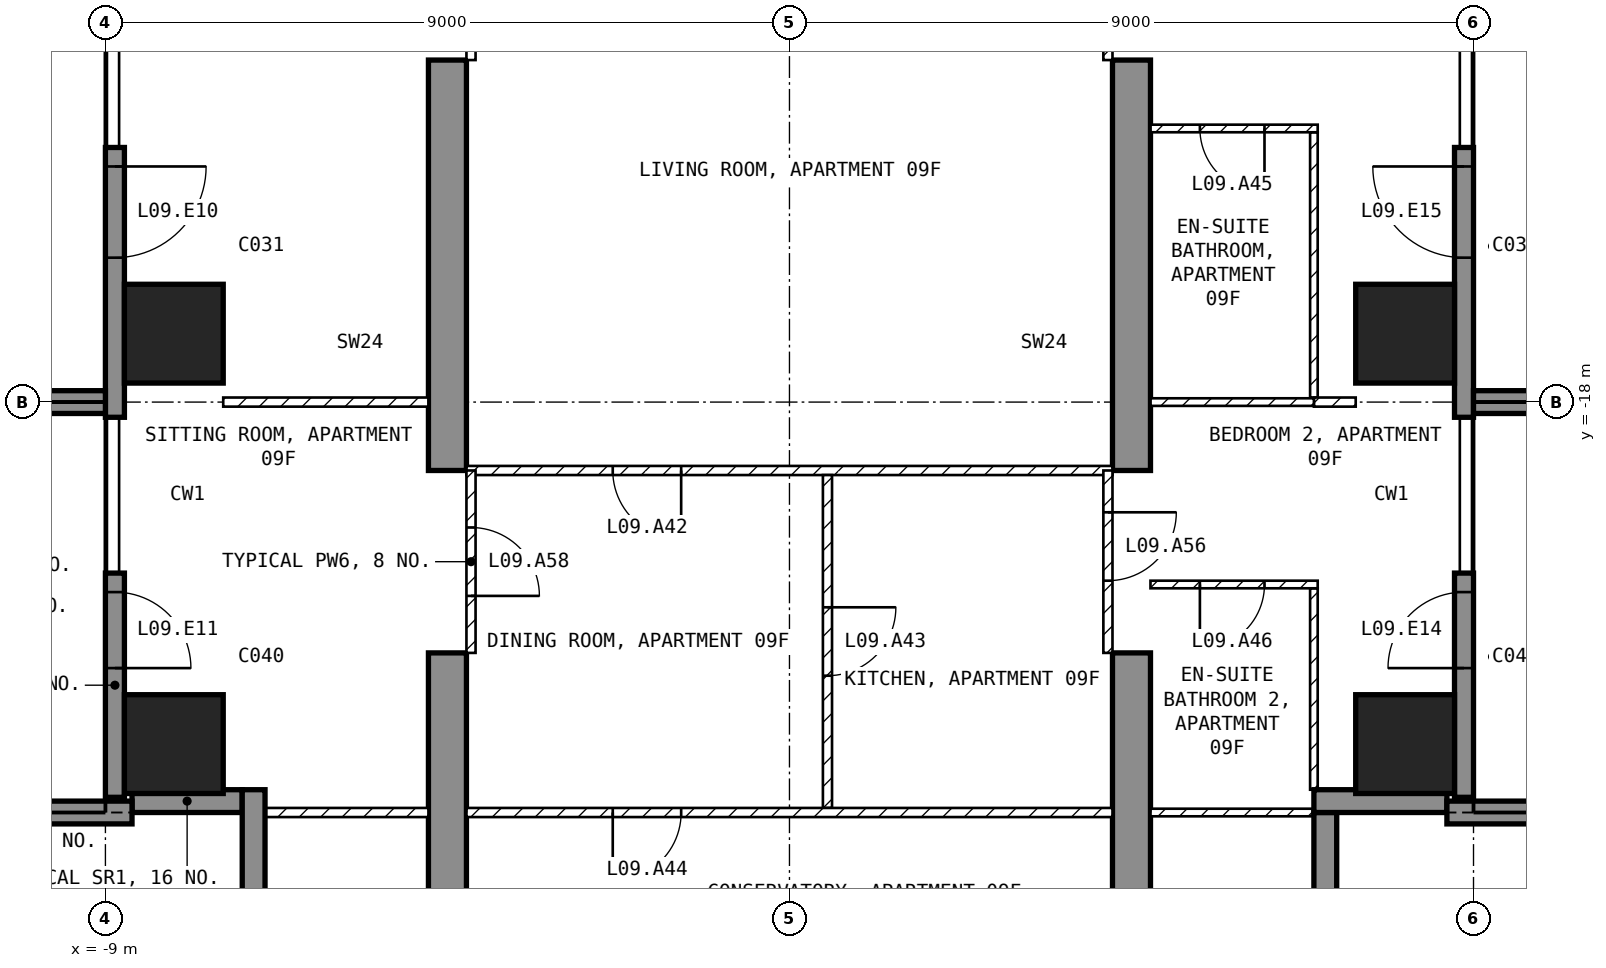
"""IFC4 building model, lengths in metres.
Left out: names, types, materials, properties, quantities, classifications, styles, units other than length and angle.
Written with IfcOpenShell. Run it as: python <this file> out.ifc"""

import sys

from ifc_helpers import new_model, si_unit, direction, frame, frame_2d, origin, origin_2d, place, context, subcontext, project, spatial, polyline, rectangle, outline, extrude, element, fill, save


model = new_model("IFC4")
c1 = context("Model", 3, precision=1e-05, world=origin(), true_north=direction((0.0, 1.0)))
c2 = subcontext(c1, "Body", "Model", "MODEL_VIEW")
j1 = project(units=[si_unit("LENGTHUNIT", "METRE"), si_unit("PLANEANGLEUNIT", "RADIAN")], contexts=[c1])
p1 = place(None, origin())
s1 = spatial("IfcSite", under=j1, at=p1, CompositionType="ELEMENT")
p2 = place(p1, origin())
s2 = spatial("IfcBuilding", under=s1, at=p2, CompositionType="ELEMENT")
p3 = place(p2, frame((0.0, 0.0, 50.5)))
s3 = spatial("IfcBuildingStorey", under=s2, at=p3, CompositionType="ELEMENT", Elevation=50.5)
for number, where, z_axis, x_axis in (
    (1, (-8.1, -22.5, -0.25), (0.0, 0.0, 1.0), (1.0, 0.0, 0.0)),
    (2, (-8.1, -17.1, -0.25), (0.0, 0.0, 1.0), (1.0, 0.0, 0.0)),
    (3, (8.1, -22.5, -0.25), (0.0, 0.0, 1.0), (1.0, 0.0, 0.0)),
    (4, (8.1, -17.1, -0.25), (0.0, 0.0, 1.0), (1.0, 0.0, 0.0)),
):
    element("IfcColumn", number, at=place(p3, frame(where, z_axis=z_axis, x_axis=x_axis)), inside=s3, PredefinedType="COLUMN", context=c2, shape_type="SweptSolid", body=[
        extrude(rectangle(XDim=1.3, YDim=1.3, at=origin_2d()), origin(), (0.0, 0.0, 1.0), 3.5),
    ])
for number, where, z_axis, x_axis in (
    (5, (-4.75, -25.45, -0.25), (1.0, 0.0, 0.0), (0.0, 1.0, 0.0)),
    (6, (4.25, -25.45, -0.25), (1.0, 0.0, 0.0), (0.0, 1.0, 0.0)),
):
    element("IfcWall", number, at=place(p3, frame(where, z_axis=z_axis, x_axis=x_axis)), inside=s3, PredefinedType="SHEAR", context=c2, shape_type="SweptSolid", body=[
        extrude(outline(polyline([(0.0, 0.0), (4.15, 0.0), (4.15, 2.65), (6.55, 2.65), (6.55, 0.0), (11.95, 0.0), (11.95, 2.65), (14.35, 2.65), (14.35, 0.0), (16.45, 0.0), (16.45, 3.5), (0.0, 3.5), (0.0, 0.0)])), origin(), (0.0, 0.0, 1.0), 0.5),
    ])
p4 = place(p3, frame((-8.875, -14.65, 0.0), z_axis=(0.0, 0.0, 1.0), x_axis=(0.0, -1.0, 0.0)))
e7 = element("IfcWall", 7, at=p4, inside=s3, PredefinedType="SOLIDWALL", context=c2, shape_type="SweptSolid", body=[
    extrude(rectangle(XDim=3.55, YDim=0.25, at=frame_2d((1.775, 0.0))), origin(), (0.0, 0.0, 1.0), 3.25),
])
p5 = place(p4, frame((0.25, 0.0, 0.0)))
e8 = element("IfcOpeningElement", 8, at=p5, cuts=e7, PredefinedType="OPENING", context=c2, shape_type="SweptSolid", body=[
    extrude(rectangle(XDim=1.2, YDim=2.4, at=frame_2d((0.6, 1.2))), frame((0.0, 0.135, 0.0), z_axis=(0.0, -1.0, 0.0), x_axis=(1.0, 0.0, 0.0)), (0.0, 0.0, 1.0), 0.27),
])
p6 = place(p3, frame((-8.875, -20.25, 0.0), z_axis=(0.0, 0.0, 1.0), x_axis=(0.0, -1.0, 0.0)))
e9 = element("IfcWall", 9, at=p6, inside=s3, PredefinedType="SOLIDWALL", context=c2, shape_type="SweptSolid", body=[
    extrude(rectangle(XDim=2.95, YDim=0.25, at=frame_2d((1.475, 0.0))), origin(), (0.0, 0.0, 1.0), 3.25),
])
p7 = place(p6, frame((0.25, 0.0, 0.0)))
e10 = element("IfcOpeningElement", 10, at=p7, cuts=e9, PredefinedType="OPENING", context=c2, shape_type="SweptSolid", body=[
    extrude(rectangle(XDim=1.0, YDim=2.4, at=frame_2d((0.5, 1.2))), frame((0.0, 0.135, 0.0), z_axis=(0.0, -1.0, 0.0), x_axis=(1.0, 0.0, 0.0)), (0.0, 0.0, 1.0), 0.27),
])
p8 = place(p3, frame((8.875, -23.2, 0.0), z_axis=(0.0, 0.0, 1.0), x_axis=(0.0, 1.0, 0.0)))
e11 = element("IfcWall", 11, at=p8, inside=s3, PredefinedType="SOLIDWALL", context=c2, shape_type="SweptSolid", body=[
    extrude(rectangle(XDim=2.95, YDim=0.25, at=frame_2d((1.475, 0.0))), origin(), (0.0, 0.0, 1.0), 3.25),
])
p9 = place(p8, frame((1.7, 0.0, 0.0)))
e12 = element("IfcOpeningElement", 12, at=p9, cuts=e11, PredefinedType="OPENING", context=c2, shape_type="SweptSolid", body=[
    extrude(rectangle(XDim=1.0, YDim=2.4, at=frame_2d((0.5, 1.2))), frame((0.0, 0.135, 0.0), z_axis=(0.0, -1.0, 0.0), x_axis=(1.0, 0.0, 0.0)), (0.0, 0.0, 1.0), 0.27),
])
p10 = place(p3, frame((8.875, -18.2, 0.0), z_axis=(0.0, 0.0, 1.0), x_axis=(0.0, 1.0, 0.0)))
e13 = element("IfcWall", 13, at=p10, inside=s3, PredefinedType="SOLIDWALL", context=c2, shape_type="SweptSolid", body=[
    extrude(rectangle(XDim=3.55, YDim=0.25, at=frame_2d((1.775, 0.0))), origin(), (0.0, 0.0, 1.0), 3.25),
])
p11 = place(p10, frame((2.1, 0.0, 0.0)))
e14 = element("IfcOpeningElement", 14, at=p11, cuts=e13, PredefinedType="OPENING", context=c2, shape_type="SweptSolid", body=[
    extrude(rectangle(XDim=1.2, YDim=2.4, at=frame_2d((0.6, 1.2))), frame((0.0, 0.135, 0.0), z_axis=(0.0, -1.0, 0.0), x_axis=(1.0, 0.0, 0.0)), (0.0, 0.0, 1.0), 0.27),
])
p12 = place(p3, frame((7.05, -25.2, 0.0), z_axis=(0.0, 0.0, 1.0), x_axis=(0.0, 1.0, 0.0)))
e15 = element("IfcWall", 15, at=p12, inside=s3, PredefinedType="SOLIDWALL", context=c2, shape_type="SweptSolid", body=[
    extrude(rectangle(XDim=1.8, YDim=0.3, at=frame_2d((0.9, 0.0))), origin(), (0.0, 0.0, 1.0), 3.25),
])
p13 = place(p3, frame((6.9, -23.25, 0.0), z_axis=(0.0, 0.0, 1.0), x_axis=(1.0, 0.0, 0.0)))
e16 = element("IfcWall", 16, at=p13, inside=s3, PredefinedType="SOLIDWALL", context=c2, shape_type="SweptSolid", body=[
    extrude(rectangle(XDim=1.75, YDim=0.3, at=frame_2d((0.875, 0.0))), origin(), (0.0, 0.0, 1.0), 3.25),
])
p14 = place(p3, frame((-8.65, -23.25, 0.0), z_axis=(0.0, 0.0, 1.0), x_axis=(1.0, 0.0, 0.0)))
e17 = element("IfcWall", 17, at=p14, inside=s3, PredefinedType="SOLIDWALL", context=c2, shape_type="SweptSolid", body=[
    extrude(rectangle(XDim=1.45, YDim=0.3, at=frame_2d((0.725, 0.0))), origin(), (0.0, 0.0, 1.0), 3.25),
])
p15 = place(p3, frame((-7.05, -23.1, 0.0), z_axis=(0.0, 0.0, 1.0), x_axis=(0.0, -1.0, 0.0)))
e18 = element("IfcWall", 18, at=p15, inside=s3, PredefinedType="SOLIDWALL", context=c2, shape_type="SweptSolid", body=[
    extrude(rectangle(XDim=1.8, YDim=0.3, at=frame_2d((0.9, 0.0))), origin(), (0.0, 0.0, 1.0), 3.25),
])
p16 = place(p3, frame((-8.65, -23.4, 0.0), z_axis=(0.0, 0.0, 1.0), x_axis=(-1.0, 0.0, 0.0)))
e19 = element("IfcWall", 19, at=p16, inside=s3, PredefinedType="SOLIDWALL", context=c2, shape_type="SweptSolid", body=[
    extrude(rectangle(XDim=3.05, YDim=0.3, at=frame_2d((1.525, 0.0))), origin(), (0.0, 0.0, 1.0), 3.25),
])
p17 = place(p3, frame((-9.0, -18.0, 0.0), z_axis=(0.0, 0.0, 1.0), x_axis=(-1.0, 0.0, 0.0)))
e20 = element("IfcWall", 20, at=p17, inside=s3, PredefinedType="SOLIDWALL", context=c2, shape_type="SweptSolid", body=[
    extrude(rectangle(XDim=2.7, YDim=0.3, at=frame_2d((1.35, 0.0))), origin(), (0.0, 0.0, 1.0), 3.25),
])
p18 = place(p3, frame((8.65, -23.4, 0.0), z_axis=(0.0, 0.0, 1.0), x_axis=(1.0, 0.0, 0.0)))
e21 = element("IfcWall", 21, at=p18, inside=s3, PredefinedType="SOLIDWALL", context=c2, shape_type="SweptSolid", body=[
    extrude(rectangle(XDim=3.05, YDim=0.3, at=frame_2d((1.525, 0.0))), origin(), (0.0, 0.0, 1.0), 3.25),
])
p19 = place(p3, frame((9.0, -18.0, 0.0), z_axis=(0.0, 0.0, 1.0), x_axis=(1.0, 0.0, 0.0)))
e22 = element("IfcWall", 22, at=p19, inside=s3, PredefinedType="SOLIDWALL", context=c2, shape_type="SweptSolid", body=[
    extrude(rectangle(XDim=2.7, YDim=0.3, at=frame_2d((1.35, 0.0))), origin(), (0.0, 0.0, 1.0), 3.25),
])
p20 = place(p3, frame((4.25, -18.9, 0.0), z_axis=(0.0, 0.0, 1.0), x_axis=(-1.0, 0.0, 0.0)))
e23 = element("IfcWall", 23, at=p20, inside=s3, PredefinedType="PARTITIONING", context=c2, shape_type="SweptSolid", body=[
    extrude(rectangle(XDim=8.5, YDim=0.12, at=frame_2d((4.25, 0.0))), origin(), (0.0, 0.0, 1.0), 3.25),
])
p21 = place(p20, frame((5.675, 0.0, 0.0)))
e24 = element("IfcOpeningElement", 24, at=p21, cuts=e23, PredefinedType="OPENING", context=c2, shape_type="SweptSolid", body=[
    extrude(rectangle(XDim=0.9, YDim=2.1, at=frame_2d((0.45, 1.05))), frame((0.0, 0.07, 0.0), z_axis=(0.0, -1.0, 0.0), x_axis=(1.0, 0.0, 0.0)), (0.0, 0.0, 1.0), 0.14),
])
p22 = place(p3, frame((0.5, -18.96, 0.0), z_axis=(0.0, 0.0, 1.0), x_axis=(0.0, -1.0, 0.0)))
e25 = element("IfcWall", 25, at=p22, inside=s3, PredefinedType="PARTITIONING", context=c2, shape_type="SweptSolid", body=[
    extrude(rectangle(XDim=4.38, YDim=0.12, at=frame_2d((2.19, 0.0))), origin(), (0.0, 0.0, 1.0), 3.25),
])
p23 = place(p22, frame((1.74, 0.0, 0.0)))
e26 = element("IfcOpeningElement", 26, at=p23, cuts=e25, PredefinedType="OPENING", context=c2, shape_type="SweptSolid", body=[
    extrude(rectangle(XDim=0.9, YDim=2.1, at=frame_2d((0.45, 1.05))), frame((0.0, 0.07, 0.0), z_axis=(0.0, -1.0, 0.0), x_axis=(1.0, 0.0, 0.0)), (0.0, 0.0, 1.0), 0.14),
])
p24 = place(p3, frame((4.25, -23.4, 0.0), z_axis=(0.0, 0.0, 1.0), x_axis=(-1.0, 0.0, 0.0)))
e27 = element("IfcWall", 27, at=p24, inside=s3, PredefinedType="PARTITIONING", context=c2, shape_type="SweptSolid", body=[
    extrude(rectangle(XDim=8.5, YDim=0.12, at=frame_2d((4.25, 0.0))), origin(), (0.0, 0.0, 1.0), 3.25),
])
p25 = place(p24, frame((5.675, 0.0, 0.0)))
e28 = element("IfcOpeningElement", 28, at=p25, cuts=e27, PredefinedType="OPENING", context=c2, shape_type="SweptSolid", body=[
    extrude(rectangle(XDim=0.9, YDim=2.1, at=frame_2d((0.45, 1.05))), frame((0.0, 0.07, 0.0), z_axis=(0.0, -1.0, 0.0), x_axis=(1.0, 0.0, 0.0)), (0.0, 0.0, 1.0), 0.14),
])
p26 = place(p3, frame((6.9, -17.94, 0.0), z_axis=(0.0, 0.0, 1.0), x_axis=(0.0, 1.0, 0.0)))
e29 = element("IfcWall", 29, at=p26, inside=s3, PredefinedType="PARTITIONING", context=c2, shape_type="SweptSolid", body=[
    extrude(rectangle(XDim=3.49, YDim=0.1, at=frame_2d((1.745, 0.0))), origin(), (0.0, 0.0, 1.0), 3.25),
])
p27 = place(p3, frame((6.95, -14.4, 0.0), z_axis=(0.0, 0.0, 1.0), x_axis=(-1.0, 0.0, 0.0)))
e30 = element("IfcWall", 30, at=p27, inside=s3, PredefinedType="PARTITIONING", context=c2, shape_type="SweptSolid", body=[
    extrude(rectangle(XDim=2.2, YDim=0.1, at=frame_2d((1.1, 0.0))), origin(), (0.0, 0.0, 1.0), 3.25),
])
p28 = place(p27, frame((0.7, 0.0, 0.0)))
e31 = element("IfcOpeningElement", 31, at=p28, cuts=e30, PredefinedType="OPENING", context=c2, shape_type="SweptSolid", body=[
    extrude(rectangle(XDim=0.85, YDim=2.1, at=frame_2d((0.425, 1.05))), frame((0.0, 0.06, 0.0), z_axis=(0.0, -1.0, 0.0), x_axis=(1.0, 0.0, 0.0)), (0.0, 0.0, 1.0), 0.12),
])
p29 = place(p3, frame((7.45, -18.0, 0.0), z_axis=(0.0, 0.0, 1.0), x_axis=(-1.0, 0.0, 0.0)))
e32 = element("IfcWall", 32, at=p29, inside=s3, PredefinedType="PARTITIONING", context=c2, shape_type="SweptSolid", body=[
    extrude(rectangle(XDim=0.55, YDim=0.12, at=frame_2d((0.275, 0.0))), origin(), (0.0, 0.0, 1.0), 3.25),
])
p30 = place(p3, frame((6.9, -18.0, 0.0), z_axis=(0.0, 0.0, 1.0), x_axis=(-1.0, 0.0, 0.0)))
e33 = element("IfcWall", 33, at=p30, inside=s3, PredefinedType="PARTITIONING", context=c2, shape_type="SweptSolid", body=[
    extrude(rectangle(XDim=2.15, YDim=0.1, at=frame_2d((1.075, 0.0))), origin(), (0.0, 0.0, 1.0), 3.25),
])
p31 = place(p3, frame((6.9, -23.1, 0.0), z_axis=(0.0, 0.0, 1.0), x_axis=(0.0, 1.0, 0.0)))
e34 = element("IfcWall", 34, at=p31, inside=s3, PredefinedType="PARTITIONING", context=c2, shape_type="SweptSolid", body=[
    extrude(rectangle(XDim=2.65, YDim=0.1, at=frame_2d((1.325, 0.0))), origin(), (0.0, 0.0, 1.0), 3.25),
])
p32 = place(p3, frame((6.95, -20.4, 0.0), z_axis=(0.0, 0.0, 1.0), x_axis=(-1.0, 0.0, 0.0)))
e35 = element("IfcWall", 35, at=p32, inside=s3, PredefinedType="PARTITIONING", context=c2, shape_type="SweptSolid", body=[
    extrude(rectangle(XDim=2.2, YDim=0.1, at=frame_2d((1.1, 0.0))), origin(), (0.0, 0.0, 1.0), 3.25),
])
p33 = place(p32, frame((0.7, 0.0, 0.0)))
e36 = element("IfcOpeningElement", 36, at=p33, cuts=e35, PredefinedType="OPENING", context=c2, shape_type="SweptSolid", body=[
    extrude(rectangle(XDim=0.85, YDim=2.1, at=frame_2d((0.425, 1.05))), frame((0.0, 0.06, 0.0), z_axis=(0.0, -1.0, 0.0), x_axis=(1.0, 0.0, 0.0)), (0.0, 0.0, 1.0), 0.12),
])
p34 = place(p3, frame((7.12, -23.4, 0.0), z_axis=(0.0, 0.0, 1.0), x_axis=(-1.0, 0.0, 0.0)))
e37 = element("IfcWall", 37, at=p34, inside=s3, PredefinedType="PARTITIONING", context=c2, shape_type="SweptSolid", body=[
    extrude(rectangle(XDim=2.37, YDim=0.1, at=frame_2d((1.185, 0.0))), origin(), (0.0, 0.0, 1.0), 3.25),
])
p35 = place(p3, frame((-4.75, -18.0, 0.0), z_axis=(0.0, 0.0, 1.0), x_axis=(-1.0, 0.0, 0.0)))
e38 = element("IfcWall", 38, at=p35, inside=s3, PredefinedType="PARTITIONING", context=c2, shape_type="SweptSolid", body=[
    extrude(rectangle(XDim=2.7, YDim=0.12, at=frame_2d((1.35, 0.0))), origin(), (0.0, 0.0, 1.0), 3.25),
])
p36 = place(p3, frame((-4.75, -23.4, 0.0), z_axis=(0.0, 0.0, 1.0), x_axis=(-1.0, 0.0, 0.0)))
e39 = element("IfcWall", 39, at=p36, inside=s3, PredefinedType="PARTITIONING", context=c2, shape_type="SweptSolid", body=[
    extrude(rectangle(XDim=2.37, YDim=0.12, at=frame_2d((1.185, 0.0))), origin(), (0.0, 0.0, 1.0), 3.25),
])
p37 = place(p3, frame((4.19, -11.1, 0.0), z_axis=(0.0, 0.0, 1.0), x_axis=(0.0, -1.0, 0.0)))
e40 = element("IfcWall", 40, at=p37, inside=s3, PredefinedType="PARTITIONING", context=c2, shape_type="SweptSolid", body=[
    extrude(rectangle(XDim=2.4, YDim=0.12, at=frame_2d((1.2, 0.0))), origin(), (0.0, 0.0, 1.0), 2.4),
])
p38 = place(p37, frame((0.75, 0.0, 0.0)))
e41 = element("IfcOpeningElement", 41, at=p38, cuts=e40, PredefinedType="OPENING", context=c2, shape_type="SweptSolid", body=[
    extrude(rectangle(XDim=0.9, YDim=2.1, at=frame_2d((0.45, 1.05))), frame((0.0, 0.07, 0.0), z_axis=(0.0, -1.0, 0.0), x_axis=(1.0, 0.0, 0.0)), (0.0, 0.0, 1.0), 0.14),
])
p39 = place(p3, frame((4.19, -18.9, 0.0), z_axis=(0.0, 0.0, 1.0), x_axis=(0.0, -1.0, 0.0)))
e42 = element("IfcWall", 42, at=p39, inside=s3, PredefinedType="PARTITIONING", context=c2, shape_type="SweptSolid", body=[
    extrude(rectangle(XDim=2.4, YDim=0.12, at=frame_2d((1.2, 0.0))), origin(), (0.0, 0.0, 1.0), 2.4),
])
p40 = place(p39, frame((0.55, 0.0, 0.0)))
e43 = element("IfcOpeningElement", 43, at=p40, cuts=e42, PredefinedType="OPENING", context=c2, shape_type="SweptSolid", body=[
    extrude(rectangle(XDim=0.9, YDim=2.1, at=frame_2d((0.45, 1.05))), frame((0.0, 0.07, 0.0), z_axis=(0.0, -1.0, 0.0), x_axis=(1.0, 0.0, 0.0)), (0.0, 0.0, 1.0), 0.14),
])
p41 = place(p3, frame((-4.19, -11.1, 0.0), z_axis=(0.0, 0.0, 1.0), x_axis=(0.0, -1.0, 0.0)))
e44 = element("IfcWall", 44, at=p41, inside=s3, PredefinedType="PARTITIONING", context=c2, shape_type="SweptSolid", body=[
    extrude(rectangle(XDim=2.4, YDim=0.12, at=frame_2d((1.2, 0.0))), origin(), (0.0, 0.0, 1.0), 2.4),
])
p42 = place(p41, frame((0.75, 0.0, 0.0)))
e45 = element("IfcOpeningElement", 45, at=p42, cuts=e44, PredefinedType="OPENING", context=c2, shape_type="SweptSolid", body=[
    extrude(rectangle(XDim=0.9, YDim=2.1, at=frame_2d((0.45, 1.05))), frame((0.0, 0.07, 0.0), z_axis=(0.0, -1.0, 0.0), x_axis=(1.0, 0.0, 0.0)), (0.0, 0.0, 1.0), 0.14),
])
p43 = place(p3, frame((-4.19, -18.9, 0.0), z_axis=(0.0, 0.0, 1.0), x_axis=(0.0, -1.0, 0.0)))
e46 = element("IfcWall", 46, at=p43, inside=s3, PredefinedType="PARTITIONING", context=c2, shape_type="SweptSolid", body=[
    extrude(rectangle(XDim=2.4, YDim=0.12, at=frame_2d((1.2, 0.0))), origin(), (0.0, 0.0, 1.0), 2.4),
])
p44 = place(p43, frame((0.75, 0.0, 0.0)))
e47 = element("IfcOpeningElement", 47, at=p44, cuts=e46, PredefinedType="OPENING", context=c2, shape_type="SweptSolid", body=[
    extrude(rectangle(XDim=0.9, YDim=2.1, at=frame_2d((0.45, 1.05))), frame((0.0, 0.07, 0.0), z_axis=(0.0, -1.0, 0.0), x_axis=(1.0, 0.0, 0.0)), (0.0, 0.0, 1.0), 0.14),
])
p45 = place(p5, origin())
e48 = element("IfcDoor", 48, at=p45, inside=s3, OperationType="SINGLE_SWING_LEFT", PredefinedType="DOOR", context=c2, shape_type="SweptSolid", body=[
    extrude(rectangle(XDim=1.2, YDim=2.4, at=frame_2d((0.6, 1.2))), frame((0.0, 0.025, 0.0), z_axis=(0.0, -1.0, 0.0), x_axis=(1.0, 0.0, 0.0)), (0.0, 0.0, 1.0), 0.05),
])
fill(e8, e48)
p46 = place(p7, origin())
e49 = element("IfcDoor", 49, at=p46, inside=s3, OperationType="SINGLE_SWING_RIGHT", PredefinedType="DOOR", context=c2, shape_type="SweptSolid", body=[
    extrude(rectangle(XDim=1.0, YDim=2.4, at=frame_2d((0.5, 1.2))), frame((0.0, 0.025, 0.0), z_axis=(0.0, -1.0, 0.0), x_axis=(1.0, 0.0, 0.0)), (0.0, 0.0, 1.0), 0.05),
])
fill(e10, e49)
p47 = place(p9, origin())
e50 = element("IfcDoor", 50, at=p47, inside=s3, OperationType="SINGLE_SWING_LEFT", PredefinedType="DOOR", context=c2, shape_type="SweptSolid", body=[
    extrude(rectangle(XDim=1.0, YDim=2.4, at=frame_2d((0.5, 1.2))), frame((0.0, 0.025, 0.0), z_axis=(0.0, -1.0, 0.0), x_axis=(1.0, 0.0, 0.0)), (0.0, 0.0, 1.0), 0.05),
])
fill(e12, e50)
p48 = place(p11, origin())
e51 = element("IfcDoor", 51, at=p48, inside=s3, OperationType="SINGLE_SWING_RIGHT", PredefinedType="DOOR", context=c2, shape_type="SweptSolid", body=[
    extrude(rectangle(XDim=1.2, YDim=2.4, at=frame_2d((0.6, 1.2))), frame((0.0, 0.025, 0.0), z_axis=(0.0, -1.0, 0.0), x_axis=(1.0, 0.0, 0.0)), (0.0, 0.0, 1.0), 0.05),
])
fill(e14, e51)
p49 = place(p21, origin())
e52 = element("IfcDoor", 52, at=p49, inside=s3, OperationType="SINGLE_SWING_LEFT", PredefinedType="DOOR", context=c2, shape_type="SweptSolid", body=[
    extrude(rectangle(XDim=0.9, YDim=2.1, at=frame_2d((0.45, 1.05))), frame((0.0, 0.025, 0.0), z_axis=(0.0, -1.0, 0.0), x_axis=(1.0, 0.0, 0.0)), (0.0, 0.0, 1.0), 0.05),
])
fill(e24, e52)
p50 = place(p23, origin())
e53 = element("IfcDoor", 53, at=p50, inside=s3, OperationType="SINGLE_SWING_LEFT", PredefinedType="DOOR", context=c2, shape_type="SweptSolid", body=[
    extrude(rectangle(XDim=0.9, YDim=2.1, at=frame_2d((0.45, 1.05))), frame((0.0, 0.025, 0.0), z_axis=(0.0, -1.0, 0.0), x_axis=(1.0, 0.0, 0.0)), (0.0, 0.0, 1.0), 0.05),
])
fill(e26, e53)
p51 = place(p25, origin())
e54 = element("IfcDoor", 54, at=p51, inside=s3, OperationType="SINGLE_SWING_RIGHT", PredefinedType="DOOR", context=c2, shape_type="SweptSolid", body=[
    extrude(rectangle(XDim=0.9, YDim=2.1, at=frame_2d((0.45, 1.05))), frame((0.0, 0.025, 0.0), z_axis=(0.0, -1.0, 0.0), x_axis=(1.0, 0.0, 0.0)), (0.0, 0.0, 1.0), 0.05),
])
fill(e28, e54)
p52 = place(p28, origin())
e55 = element("IfcDoor", 55, at=p52, inside=s3, OperationType="SINGLE_SWING_LEFT", PredefinedType="DOOR", context=c2, shape_type="SweptSolid", body=[
    extrude(rectangle(XDim=0.85, YDim=2.1, at=frame_2d((0.425, 1.05))), frame((0.0, 0.025, 0.0), z_axis=(0.0, -1.0, 0.0), x_axis=(1.0, 0.0, 0.0)), (0.0, 0.0, 1.0), 0.05),
])
fill(e31, e55)
p53 = place(p33, origin())
e56 = element("IfcDoor", 56, at=p53, inside=s3, OperationType="SINGLE_SWING_RIGHT", PredefinedType="DOOR", context=c2, shape_type="SweptSolid", body=[
    extrude(rectangle(XDim=0.85, YDim=2.1, at=frame_2d((0.425, 1.05))), frame((0.0, 0.025, 0.0), z_axis=(0.0, -1.0, 0.0), x_axis=(1.0, 0.0, 0.0)), (0.0, 0.0, 1.0), 0.05),
])
fill(e36, e56)
p54 = place(p40, origin())
e57 = element("IfcDoor", 57, at=p54, inside=s3, OperationType="SINGLE_SWING_LEFT", PredefinedType="DOOR", context=c2, shape_type="SweptSolid", body=[
    extrude(rectangle(XDim=0.9, YDim=2.1, at=frame_2d((0.45, 1.05))), frame((0.0, 0.025, 0.0), z_axis=(0.0, -1.0, 0.0), x_axis=(1.0, 0.0, 0.0)), (0.0, 0.0, 1.0), 0.05),
])
fill(e43, e57)
p55 = place(p44, origin())
e58 = element("IfcDoor", 58, at=p55, inside=s3, OperationType="SINGLE_SWING_RIGHT", PredefinedType="DOOR", context=c2, shape_type="SweptSolid", body=[
    extrude(rectangle(XDim=0.9, YDim=2.1, at=frame_2d((0.45, 1.05))), frame((0.0, 0.025, 0.0), z_axis=(0.0, -1.0, 0.0), x_axis=(1.0, 0.0, 0.0)), (0.0, 0.0, 1.0), 0.05),
])
fill(e47, e58)
save(model, sys.argv[1])
